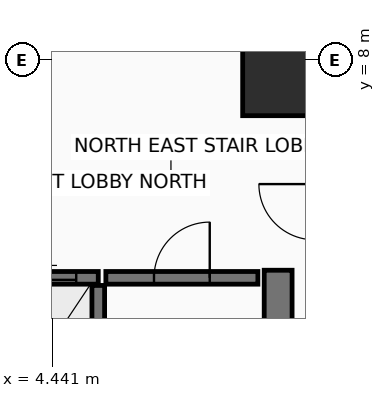
"""IFC4 building model, lengths in metres.
Left out: names, types, materials, properties, quantities, classifications, styles, units other than length and angle.
Written with IfcOpenShell. Run it as: python <this file> out.ifc"""

import sys

from ifc_helpers import new_model, si_unit, direction, frame, frame_2d, origin, origin_2d, place, context, subcontext, project, spatial, rectangle, extrude, element, fill, save


model = new_model("IFC4")
c1 = context("Model", 3, precision=1e-05, world=origin(), true_north=direction((0.0, 1.0)))
c2 = subcontext(c1, "Body", "Model", "MODEL_VIEW")
j1 = project(units=[si_unit("LENGTHUNIT", "METRE"), si_unit("PLANEANGLEUNIT", "RADIAN")], contexts=[c1])
p1 = place(None, origin())
s1 = spatial("IfcSite", under=j1, at=p1, CompositionType="ELEMENT")
p2 = place(p1, origin())
s2 = spatial("IfcBuilding", under=s1, at=p2, CompositionType="ELEMENT")
p3 = place(p2, frame((0.0, 0.0, 26.5)))
s3 = spatial("IfcBuildingStorey", under=s2, at=p3, CompositionType="ELEMENT", Elevation=26.5)
p4 = place(p3, frame((8.9, 7.6, 0.0), z_axis=(0.0, 0.0, 1.0), x_axis=(1.0, 0.0, 0.0)))
e1 = element("IfcColumn", 1, at=p4, inside=s3, PredefinedType="COLUMN", context=c2, shape_type="SweptSolid", body=[
    extrude(rectangle(XDim=1.4, YDim=1.4, at=origin_2d()), origin(), (0.0, 0.0, 1.0), 5.3),
])
p5 = place(p3, frame((8.9, -6.85, 0.0), z_axis=(0.0, 0.0, 1.0), x_axis=(0.0, 1.0, 0.0)))
e2 = element("IfcWall", 2, at=p5, inside=s3, PredefinedType="SHEAR", context=c2, shape_type="SweptSolid", body=[
    extrude(rectangle(XDim=10.7, YDim=0.55, at=frame_2d((5.35, 0.0))), origin(), (0.0, 0.0, 1.0), 5.105),
])
p6 = place(p3, frame((5.35, -3.75, 0.0), z_axis=(0.0, 0.0, 1.0), x_axis=(0.0, 1.0, 0.0)))
e3 = element("IfcWall", 3, at=p6, inside=s3, PredefinedType="SHEAR", context=c2, shape_type="SweptSolid", body=[
    extrude(rectangle(XDim=7.3, YDim=0.25, at=frame_2d((3.65, 0.0))), origin(), (0.0, 0.0, 1.0), 5.105),
])
p7 = place(p3, frame((5.5, 3.7, 0.0), z_axis=(0.0, 0.0, 1.0), x_axis=(1.0, 0.0, 0.0)))
e4 = element("IfcWall", 4, at=p7, inside=s3, PredefinedType="SHEAR", context=c2, shape_type="SweptSolid", body=[
    extrude(rectangle(XDim=3.0, YDim=0.25, at=frame_2d((1.5, 0.0))), origin(), (0.0, 0.0, 1.0), 5.105),
])
p8 = place(p7, frame((0.95, 0.0, 0.0)))
e5 = element("IfcOpeningElement", 5, at=p8, cuts=e4, PredefinedType="OPENING", context=c2, shape_type="SweptSolid", body=[
    extrude(rectangle(XDim=1.1, YDim=2.15, at=frame_2d((0.55, 1.075))), frame((0.0, 0.135, 0.0), z_axis=(0.0, -1.0, 0.0), x_axis=(1.0, 0.0, 0.0)), (0.0, 0.0, 1.0), 0.27),
])
p9 = place(p3, frame((3.28, 3.7, 0.0), z_axis=(0.0, 0.0, 1.0), x_axis=(1.0, 0.0, 0.0)))
e6 = element("IfcWall", 6, at=p9, inside=s3, PredefinedType="SHEAR", context=c2, shape_type="SweptSolid", body=[
    extrude(rectangle(XDim=2.07, YDim=0.25, at=frame_2d((1.035, 0.0))), origin(), (0.0, 0.0, 1.0), 5.105),
])
p10 = place(p9, frame((0.435, 0.0, 0.0)))
e7 = element("IfcOpeningElement", 7, at=p10, cuts=e6, PredefinedType="OPENING", context=c2, shape_type="SweptSolid", body=[
    extrude(rectangle(XDim=1.2, YDim=2.2, at=frame_2d((0.6, 1.1))), frame((0.0, 0.135, 0.0), z_axis=(0.0, -1.0, 0.0), x_axis=(1.0, 0.0, 0.0)), (0.0, 0.0, 1.0), 0.27),
])
p11 = place(p8, frame((1.1, 0.0, 0.0), z_axis=(0.0, 0.0, 1.0), x_axis=(-1.0, 0.0, 0.0)))
e8 = element("IfcDoor", 8, at=p11, inside=s3, OperationType="SINGLE_SWING_LEFT", PredefinedType="DOOR", context=c2, shape_type="SweptSolid", body=[
    extrude(rectangle(XDim=1.1, YDim=2.15, at=frame_2d((0.55, 1.075))), frame((0.0, 0.025, 0.0), z_axis=(0.0, -1.0, 0.0), x_axis=(1.0, 0.0, 0.0)), (0.0, 0.0, 1.0), 0.05),
])
fill(e5, e8)
p12 = place(p10, origin())
e9 = element("IfcDoor", 9, at=p12, inside=s3, OperationType="SLIDING_TO_RIGHT", PredefinedType="DOOR", context=c2, shape_type="SweptSolid", body=[
    extrude(rectangle(XDim=1.2, YDim=2.2, at=frame_2d((0.6, 1.1))), frame((0.0, 0.025, 0.0), z_axis=(0.0, -1.0, 0.0), x_axis=(1.0, 0.0, 0.0)), (0.0, 0.0, 1.0), 0.05),
])
fill(e7, e9)
save(model, sys.argv[1])
